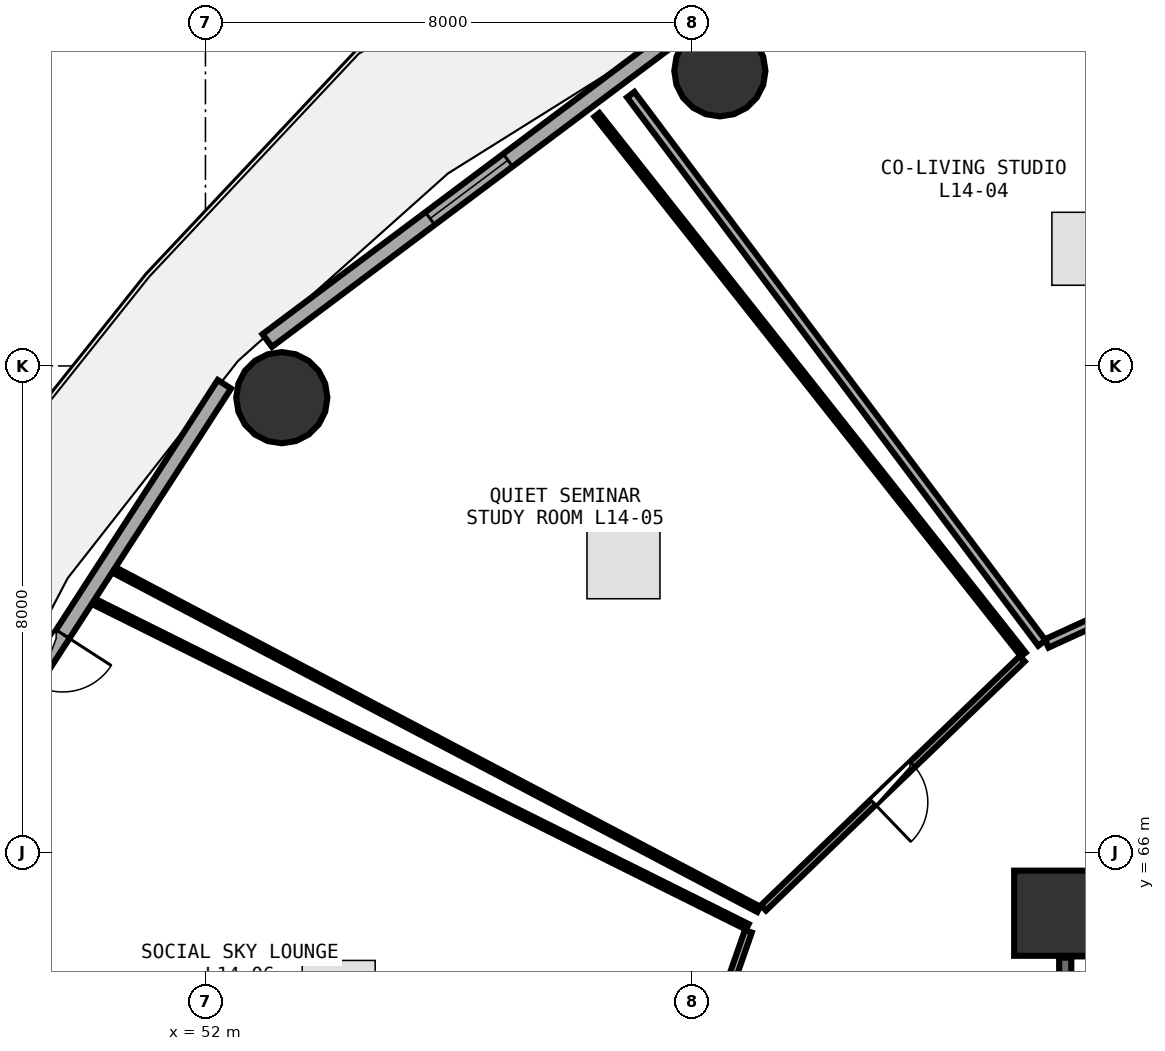
"""IFC4 building model, lengths in metres.
Left out: names, types, materials, properties, quantities, classifications, styles, units other than length and angle.
Written with IfcOpenShell. Run it as: python <this file> out.ifc"""

import sys

from ifc_helpers import new_model, si_unit, direction, frame, frame_2d, origin, origin_2d, place, context, subcontext, project, spatial, rectangle, circle, extrude, element, fill, save


model = new_model("IFC4")
c1 = context("Model", 3, precision=1e-05, world=origin(), true_north=direction((0.0, 1.0)))
c2 = subcontext(c1, "Body", "Model", "MODEL_VIEW")
j1 = project(units=[si_unit("LENGTHUNIT", "METRE"), si_unit("PLANEANGLEUNIT", "RADIAN")], contexts=[c1])
p1 = place(None, origin())
s1 = spatial("IfcSite", under=j1, at=p1, CompositionType="ELEMENT")
p2 = place(p1, origin())
s2 = spatial("IfcBuilding", under=s1, at=p2, CompositionType="ELEMENT")
p3 = place(p2, frame((0.0, 0.0, 56.25)))
s3 = spatial("IfcBuildingStorey", under=s2, at=p3, CompositionType="ELEMENT", Elevation=56.25)
p4 = place(p3, frame((66.0, 65.0, 0.0), z_axis=(0.0, 0.0, 1.0), x_axis=(1.0, 0.0, 0.0)))
e1 = element("IfcColumn", 1, at=p4, inside=s3, PredefinedType="PILASTER", context=c2, shape_type="SweptSolid", body=[
    extrude(rectangle(XDim=1.4, YDim=1.4, at=origin_2d()), origin(), (0.0, 0.0, 1.0), 3.75),
])
for number, where, z_axis, x_axis in (
    (2, (60.46, 78.854, 0.0), (0.0, 0.0, 1.0), (1.0, 0.0, 0.0)),
    (3, (53.256, 73.478, 0.0), (0.0, 0.0, 1.0), (1.0, 0.0, 0.0)),
):
    element("IfcColumn", number, at=place(p3, frame(where, z_axis=z_axis, x_axis=x_axis)), inside=s3, PredefinedType="COLUMN", context=c2, shape_type="SweptSolid", body=[
        extrude(circle(Radius=0.75, at=origin_2d()), origin(), (0.0, 0.0, 1.0), 3.75),
    ])
p5 = place(p3, frame((59.651, 79.389, 0.0), z_axis=(0.0, 0.0, 1.0), x_axis=(-0.80030733173, -0.599590005569, 0.0)))
e4 = element("IfcWall", 4, at=p5, inside=s3, PredefinedType="SOLIDWALL", context=c2, shape_type="SweptSolid", body=[
    extrude(rectangle(XDim=8.291, YDim=0.26, at=frame_2d((4.145, 0.0))), origin(), (0.0, 0.0, 1.0), 3.475),
])
p6 = place(p5, frame((3.345, 0.0, 0.85)))
e5 = element("IfcOpeningElement", 5, at=p6, cuts=e4, PredefinedType="OPENING", context=c2, shape_type="SweptSolid", body=[
    extrude(rectangle(XDim=1.6, YDim=1.45, at=frame_2d((0.8, 0.725))), frame((0.0, 0.14, 0.0), z_axis=(0.0, -1.0, 0.0), x_axis=(1.0, 0.0, 0.0)), (0.0, 0.0, 1.0), 0.28),
])
p7 = place(p3, frame((52.311, 73.698, 0.0), z_axis=(0.0, 0.0, 1.0), x_axis=(-0.543005114258, -0.839729388488, 0.0)))
e6 = element("IfcWall", 6, at=p7, inside=s3, PredefinedType="SOLIDWALL", context=c2, shape_type="SweptSolid", body=[
    extrude(rectangle(XDim=7.938, YDim=0.26, at=frame_2d((3.969, 0.0))), origin(), (0.0, 0.0, 1.0), 3.475),
])
p8 = place(p7, frame((4.894, 0.0, 0.0)))
e7 = element("IfcOpeningElement", 7, at=p8, cuts=e6, PredefinedType="OPENING", context=c2, shape_type="SweptSolid", body=[
    extrude(rectangle(XDim=0.95, YDim=2.1, at=frame_2d((0.475, 1.05))), frame((0.0, 0.14, 0.0), z_axis=(0.0, -1.0, 0.0), x_axis=(1.0, 0.0, 0.0)), (0.0, 0.0, 1.0), 0.28),
])
p9 = place(p7, frame((6.194, 0.0, 0.85)))
e8 = element("IfcOpeningElement", 8, at=p9, cuts=e6, PredefinedType="OPENING", context=c2, shape_type="SweptSolid", body=[
    extrude(rectangle(XDim=1.2, YDim=1.45, at=frame_2d((0.6, 0.725))), frame((0.0, 0.14, 0.0), z_axis=(0.0, -1.0, 0.0), x_axis=(1.0, 0.0, 0.0)), (0.0, 0.0, 1.0), 0.28),
])
p10 = place(p3, frame((73.42, 64.39, 0.0), z_axis=(0.0, 0.0, 1.0), x_axis=(-1.0, 0.0, 0.0)))
e9 = element("IfcWall", 9, at=p10, inside=s3, PredefinedType="SHEAR", context=c2, shape_type="SweptSolid", body=[
    extrude(rectangle(XDim=7.16, YDim=0.2, at=frame_2d((3.58, 0.0))), origin(), (0.0, 0.0, 1.0), 3.49),
])
p11 = place(p3, frame((66.14, 64.27, 0.0), z_axis=(0.0, 0.0, 1.0), x_axis=(0.0, -1.0, 0.0)))
e10 = element("IfcWall", 10, at=p11, inside=s3, PredefinedType="SHEAR", context=c2, shape_type="SweptSolid", body=[
    extrude(rectangle(XDim=3.07, YDim=0.2, at=frame_2d((1.535, 0.0))), origin(), (0.0, 0.0, 1.0), 3.49),
])
p12 = place(p11, frame((1.01, 0.0, 0.0)))
e11 = element("IfcOpeningElement", 11, at=p12, cuts=e10, PredefinedType="OPENING", context=c2, shape_type="SweptSolid", body=[
    extrude(rectangle(XDim=1.05, YDim=2.1, at=frame_2d((0.525, 1.05))), frame((0.0, 0.11, 0.0), z_axis=(0.0, -1.0, 0.0), x_axis=(1.0, 0.0, 0.0)), (0.0, 0.0, 1.0), 0.22),
])
p13 = place(p3, frame((68.708, 70.751, 0.0), z_axis=(0.0, 0.0, 1.0), x_axis=(-0.909329201607, -0.416077400378, 0.0)))
e12 = element("IfcWall", 12, at=p13, inside=s3, PredefinedType="PARTITIONING", context=c2, shape_type="SweptSolid", body=[
    extrude(rectangle(XDim=3.16, YDim=0.15, at=frame_2d((1.58, 0.0))), origin(), (0.0, 0.0, 1.0), 3.48),
])
p14 = place(p13, frame((1.105, 0.0, 0.0)))
e13 = element("IfcOpeningElement", 13, at=p14, cuts=e12, PredefinedType="OPENING", context=c2, shape_type="SweptSolid", body=[
    extrude(rectangle(XDim=0.95, YDim=2.08, at=frame_2d((0.475, 1.04))), frame((0.0, 0.085, 0.0), z_axis=(0.0, -1.0, 0.0), x_axis=(1.0, 0.0, 0.0)), (0.0, 0.0, 1.0), 0.17),
])
p15 = place(p3, frame((65.432, 69.183, 0.0), z_axis=(0.0, 0.0, 1.0), x_axis=(-0.720434955678, -0.69352251199, 0.0)))
e14 = element("IfcWall", 14, at=p15, inside=s3, PredefinedType="PARTITIONING", context=c2, shape_type="SweptSolid", body=[
    extrude(rectangle(XDim=5.906, YDim=0.12, at=frame_2d((2.953, 0.0))), origin(), (0.0, 0.0, 1.0), 2.875),
])
p16 = place(p15, frame((2.503, 0.0, 0.0)))
e15 = element("IfcOpeningElement", 15, at=p16, cuts=e14, PredefinedType="OPENING", context=c2, shape_type="SweptSolid", body=[
    extrude(rectangle(XDim=0.9, YDim=2.08, at=frame_2d((0.45, 1.04))), frame((0.0, 0.07, 0.0), z_axis=(0.0, -1.0, 0.0), x_axis=(1.0, 0.0, 0.0)), (0.0, 0.0, 1.0), 0.14),
])
p17 = place(p3, frame((60.928, 64.702, 0.0), z_axis=(0.0, 0.0, 1.0), x_axis=(-0.329626249966, -0.944111505773, 0.0)))
e16 = element("IfcWall", 16, at=p17, inside=s3, PredefinedType="PARTITIONING", context=c2, shape_type="SweptSolid", body=[
    extrude(rectangle(XDim=5.677, YDim=0.12, at=frame_2d((2.839, 0.0))), origin(), (0.0, 0.0, 1.0), 3.48),
])
p18 = place(p17, frame((2.389, 0.0, 0.0)))
e17 = element("IfcOpeningElement", 17, at=p18, cuts=e16, PredefinedType="OPENING", context=c2, shape_type="SweptSolid", body=[
    extrude(rectangle(XDim=0.9, YDim=2.08, at=frame_2d((0.45, 1.04))), frame((0.0, 0.07, 0.0), z_axis=(0.0, -1.0, 0.0), x_axis=(1.0, 0.0, 0.0)), (0.0, 0.0, 1.0), 0.14),
])
p19 = place(p3, frame((65.756, 69.443, 0.0), z_axis=(0.0, 0.0, 1.0), x_axis=(-0.599892569248, 0.800080561794, 0.0)))
e18 = element("IfcWall", 18, at=p19, inside=s3, PredefinedType="PARTITIONING", context=c2, shape_type="SweptSolid", body=[
    extrude(rectangle(XDim=11.272, YDim=0.15, at=frame_2d((5.636, 0.0))), origin(), (0.0, 0.0, 1.0), 2.875),
])
p20 = place(p3, frame((61.099, 65.065, 0.0), z_axis=(0.0, 0.0, 1.0), x_axis=(-0.884914680824, 0.46575316173, 0.0)))
e19 = element("IfcWall", 19, at=p20, inside=s3, PredefinedType="PARTITIONING", context=c2, shape_type="SweptSolid", body=[
    extrude(rectangle(XDim=11.963, YDim=0.1, at=frame_2d((5.981, 0.0))), origin(), (0.0, 0.0, 1.0), 2.875),
])
p21 = place(p3, frame((58.438, 78.13, 0.0), z_axis=(0.0, 0.0, 1.0), x_axis=(0.620037561985, -0.78457212653, 0.0)))
e20 = element("IfcWall", 20, at=p21, inside=s3, PredefinedType="PARTITIONING", context=c2, shape_type="SweptSolid", body=[
    extrude(rectangle(XDim=11.31, YDim=0.1, at=frame_2d((5.655, 0.0))), origin(), (0.0, 0.0, 1.0), 2.875),
])
p22 = place(p3, frame((50.173, 70.121, 0.0), z_axis=(0.0, 0.0, 1.0), x_axis=(0.895272258208, -0.445519453764, 0.0)))
e21 = element("IfcWall", 21, at=p22, inside=s3, PredefinedType="PARTITIONING", context=c2, shape_type="SweptSolid", body=[
    extrude(rectangle(XDim=11.996, YDim=0.1, at=frame_2d((5.998, 0.0))), origin(), (0.0, 0.0, 1.0), 2.875),
])
p23 = place(p6, origin())
e22 = element("IfcWindow", 22, at=p23, inside=s3, PartitioningType="SINGLE_PANEL", PredefinedType="WINDOW", context=c2, shape_type="SweptSolid", body=[
    extrude(rectangle(XDim=1.6, YDim=1.45, at=frame_2d((0.8, 0.725))), frame((0.0, 0.03, 0.0), z_axis=(0.0, -1.0, 0.0), x_axis=(1.0, 0.0, 0.0)), (0.0, 0.0, 1.0), 0.06),
])
fill(e5, e22)
p24 = place(p8, frame((0.95, 0.0, 0.0), z_axis=(0.0, 0.0, 1.0), x_axis=(-1.0, 0.0, 0.0)))
e23 = element("IfcDoor", 23, at=p24, inside=s3, OperationType="SINGLE_SWING_RIGHT", PredefinedType="DOOR", context=c2, shape_type="SweptSolid", body=[
    extrude(rectangle(XDim=0.95, YDim=2.1, at=frame_2d((0.475, 1.05))), frame((0.0, 0.025, 0.0), z_axis=(0.0, -1.0, 0.0), x_axis=(1.0, 0.0, 0.0)), (0.0, 0.0, 1.0), 0.05),
])
fill(e7, e23)
p25 = place(p16, origin())
e24 = element("IfcDoor", 24, at=p25, inside=s3, OperationType="SINGLE_SWING_RIGHT", PredefinedType="DOOR", context=c2, shape_type="SweptSolid", body=[
    extrude(rectangle(XDim=0.9, YDim=2.08, at=frame_2d((0.45, 1.04))), frame((0.0, 0.025, 0.0), z_axis=(0.0, -1.0, 0.0), x_axis=(1.0, 0.0, 0.0)), (0.0, 0.0, 1.0), 0.05),
])
fill(e15, e24)
save(model, sys.argv[1])
